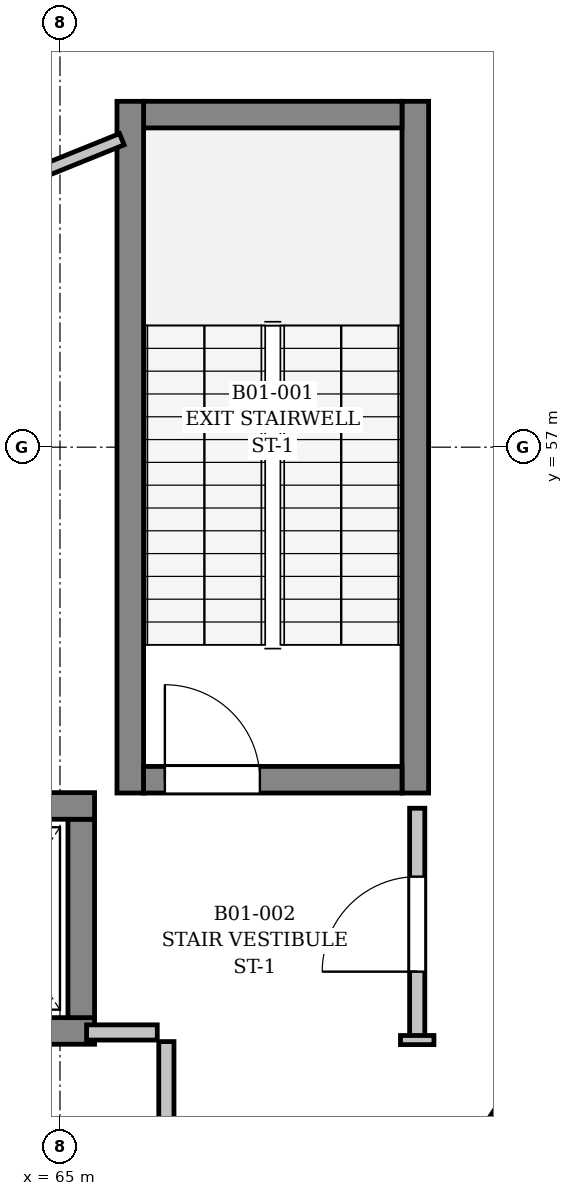
"""IFC4 building model, lengths in metres.
Left out: names, types, materials, properties, quantities, classifications, styles, units other than length and angle.
Written with IfcOpenShell. Run it as: python <this file> out.ifc"""

import sys

from ifc_helpers import new_model, si_unit, direction, frame, frame_2d, origin, place, context, subcontext, project, spatial, rectangle, extrude, element, fill, save


model = new_model("IFC4")
c1 = context("Model", 3, precision=1e-05, world=origin(), true_north=direction((0.0, 1.0)))
c2 = subcontext(c1, "Body", "Model", "MODEL_VIEW")
j1 = project(units=[si_unit("LENGTHUNIT", "METRE"), si_unit("PLANEANGLEUNIT", "RADIAN")], contexts=[c1])
p1 = place(None, origin())
s1 = spatial("IfcSite", under=j1, at=p1, CompositionType="ELEMENT")
p2 = place(p1, origin())
s2 = spatial("IfcBuilding", under=s1, at=p2, CompositionType="ELEMENT")
p3 = place(p2, frame((0.0, 0.0, -5.4)))
s3 = spatial("IfcBuildingStorey", under=s2, at=p3, CompositionType="ELEMENT", Elevation=-5.4)
p4 = place(p3, frame((72.332, 50.206, 0.0), z_axis=(0.0, 0.0, 1.0), x_axis=(-0.555571837096, -0.831468540491, 0.0)))
e1 = element("IfcWall", 1, at=p4, inside=s3, PredefinedType="USERDEFINED", context=c2, shape_type="SweptSolid", body=[
    extrude(rectangle(XDim=6.849, YDim=0.55, at=frame_2d((3.425, 0.0))), origin(), (0.0, 0.0, 1.0), 4.95),
])
p5 = place(p3, frame((69.675, 52.45, 0.0), z_axis=(0.0, 0.0, 1.0), x_axis=(0.0, 1.0, 0.0)))
e2 = element("IfcWall", 2, at=p5, inside=s3, PredefinedType="SHEAR", context=c2, shape_type="SweptSolid", body=[
    extrude(rectangle(XDim=9.1, YDim=0.35, at=frame_2d((4.55, 0.0))), origin(), (0.0, 0.0, 1.0), 4.95),
])
p6 = place(p3, frame((69.5, 61.375, 0.0), z_axis=(0.0, 0.0, 1.0), x_axis=(-1.0, 0.0, 0.0)))
e3 = element("IfcWall", 3, at=p6, inside=s3, PredefinedType="SHEAR", context=c2, shape_type="SweptSolid", body=[
    extrude(rectangle(XDim=3.4, YDim=0.35, at=frame_2d((1.7, 0.0))), origin(), (0.0, 0.0, 1.0), 4.95),
])
p7 = place(p3, frame((65.925, 61.55, 0.0), z_axis=(0.0, 0.0, 1.0), x_axis=(0.0, -1.0, 0.0)))
e4 = element("IfcWall", 4, at=p7, inside=s3, PredefinedType="SHEAR", context=c2, shape_type="SweptSolid", body=[
    extrude(rectangle(XDim=9.1, YDim=0.35, at=frame_2d((4.55, 0.0))), origin(), (0.0, 0.0, 1.0), 4.95),
])
p8 = place(p3, frame((66.1, 52.625, 0.0), z_axis=(0.0, 0.0, 1.0), x_axis=(1.0, 0.0, 0.0)))
e5 = element("IfcWall", 5, at=p8, inside=s3, PredefinedType="SHEAR", context=c2, shape_type="SweptSolid", body=[
    extrude(rectangle(XDim=3.4, YDim=0.35, at=frame_2d((1.7, 0.0))), origin(), (0.0, 0.0, 1.0), 4.95),
])
p9 = place(p8, frame((0.28, 0.0, 0.0)))
e6 = element("IfcOpeningElement", 6, at=p9, cuts=e5, PredefinedType="OPENING", context=c2, shape_type="SweptSolid", body=[
    extrude(rectangle(XDim=1.25, YDim=2.2, at=frame_2d((0.625, 1.1))), frame((0.0, 0.185, 0.0), z_axis=(0.0, -1.0, 0.0), x_axis=(1.0, 0.0, 0.0)), (0.0, 0.0, 1.0), 0.37),
])
p10 = place(p3, frame((62.945, 49.32, 0.0), z_axis=(0.0, 0.0, 1.0), x_axis=(1.0, 0.0, 0.0)))
e7 = element("IfcWall", 7, at=p10, inside=s3, PredefinedType="SHEAR", context=c2, shape_type="SweptSolid", body=[
    extrude(rectangle(XDim=2.51, YDim=0.35, at=frame_2d((1.255, 0.0))), origin(), (0.0, 0.0, 1.0), 4.95),
])
p11 = place(p10, frame((0.705, 0.0, 0.0)))
e8 = element("IfcOpeningElement", 8, at=p11, cuts=e7, PredefinedType="OPENING", context=c2, shape_type="SweptSolid", body=[
    extrude(rectangle(XDim=1.1, YDim=2.2, at=frame_2d((0.55, 1.1))), frame((0.0, 0.185, 0.0), z_axis=(0.0, -1.0, 0.0), x_axis=(1.0, 0.0, 0.0)), (0.0, 0.0, 1.0), 0.37),
])
p12 = place(p3, frame((65.28, 49.495, 0.0), z_axis=(0.0, 0.0, 1.0), x_axis=(0.0, 1.0, 0.0)))
e9 = element("IfcWall", 9, at=p12, inside=s3, PredefinedType="SHEAR", context=c2, shape_type="SweptSolid", body=[
    extrude(rectangle(XDim=2.61, YDim=0.35, at=frame_2d((1.305, 0.0))), origin(), (0.0, 0.0, 1.0), 4.95),
])
p13 = place(p3, frame((65.455, 52.28, 0.0), z_axis=(0.0, 0.0, 1.0), x_axis=(-1.0, 0.0, 0.0)))
e10 = element("IfcWall", 10, at=p13, inside=s3, PredefinedType="SHEAR", context=c2, shape_type="SweptSolid", body=[
    extrude(rectangle(XDim=2.51, YDim=0.35, at=frame_2d((1.255, 0.0))), origin(), (0.0, 0.0, 1.0), 4.95),
])
p14 = place(p3, frame((66.4, 46.32, 0.0), z_axis=(0.0, 0.0, 1.0), x_axis=(0.0, 1.0, 0.0)))
e11 = element("IfcWall", 11, at=p14, inside=s3, PredefinedType="PARTITIONING", context=c2, shape_type="SweptSolid", body=[
    extrude(rectangle(XDim=2.86, YDim=0.2, at=frame_2d((1.43, 0.0))), origin(), (0.0, 0.0, 1.0), 4.95),
])
p15 = place(p3, frame((65.35, 49.3, 0.0), z_axis=(0.0, 0.0, 1.0), x_axis=(1.0, 0.0, 0.0)))
e12 = element("IfcWall", 12, at=p15, inside=s3, PredefinedType="PARTITIONING", context=c2, shape_type="SweptSolid", body=[
    extrude(rectangle(XDim=0.93, YDim=0.2, at=frame_2d((0.465, 0.0))), origin(), (0.0, 0.0, 1.0), 4.95),
])
p16 = place(p3, frame((69.7, 49.2, 0.0), z_axis=(0.0, 0.0, 1.0), x_axis=(0.0, 1.0, 0.0)))
e13 = element("IfcWall", 13, at=p16, inside=s3, PredefinedType="PARTITIONING", context=c2, shape_type="SweptSolid", body=[
    extrude(rectangle(XDim=3.05, YDim=0.2, at=frame_2d((1.525, 0.0))), origin(), (0.0, 0.0, 1.0), 3.34),
])
p17 = place(p16, frame((0.9, 0.0, 0.0)))
e14 = element("IfcOpeningElement", 14, at=p17, cuts=e13, PredefinedType="OPENING", context=c2, shape_type="SweptSolid", body=[
    extrude(rectangle(XDim=1.25, YDim=2.2, at=frame_2d((0.625, 1.1))), frame((0.0, 0.11, 0.0), z_axis=(0.0, -1.0, 0.0), x_axis=(1.0, 0.0, 0.0)), (0.0, 0.0, 1.0), 0.22),
])
p18 = place(p3, frame((63.567, 60.144, 0.0), z_axis=(0.0, 0.0, 1.0), x_axis=(0.927164439183, 0.374654644591, 0.0)))
e15 = element("IfcWall", 15, at=p18, inside=s3, PredefinedType="PARTITIONING", context=c2, shape_type="SweptSolid", body=[
    extrude(rectangle(XDim=2.423, YDim=0.16, at=frame_2d((1.211, 0.0))), origin(), (0.0, 0.0, 1.0), 4.95),
])
p19 = place(p3, frame((69.92, 49.2, 0.0), z_axis=(0.0, 0.0, 1.0), x_axis=(-1.0, 0.0, 0.0)))
e16 = element("IfcWall", 16, at=p19, inside=s3, PredefinedType="PARTITIONING", context=c2, shape_type="SweptSolid", body=[
    extrude(rectangle(XDim=0.44, YDim=0.12, at=frame_2d((0.22, 0.0))), origin(), (0.0, 0.0, 1.0), 4.95),
])
p20 = place(p9, origin())
e17 = element("IfcDoor", 17, at=p20, inside=s3, OperationType="SINGLE_SWING_LEFT", PredefinedType="DOOR", context=c2, shape_type="SweptSolid", body=[
    extrude(rectangle(XDim=1.25, YDim=2.2, at=frame_2d((0.625, 1.1))), frame((0.0, 0.025, 0.0), z_axis=(0.0, -1.0, 0.0), x_axis=(1.0, 0.0, 0.0)), (0.0, 0.0, 1.0), 0.05),
])
fill(e6, e17)
p21 = place(p17, origin())
e18 = element("IfcDoor", 18, at=p21, inside=s3, OperationType="SINGLE_SWING_LEFT", PredefinedType="DOOR", context=c2, shape_type="SweptSolid", body=[
    extrude(rectangle(XDim=1.25, YDim=2.2, at=frame_2d((0.625, 1.1))), frame((0.0, 0.025, 0.0), z_axis=(0.0, -1.0, 0.0), x_axis=(1.0, 0.0, 0.0)), (0.0, 0.0, 1.0), 0.05),
])
fill(e14, e18)
save(model, sys.argv[1])
